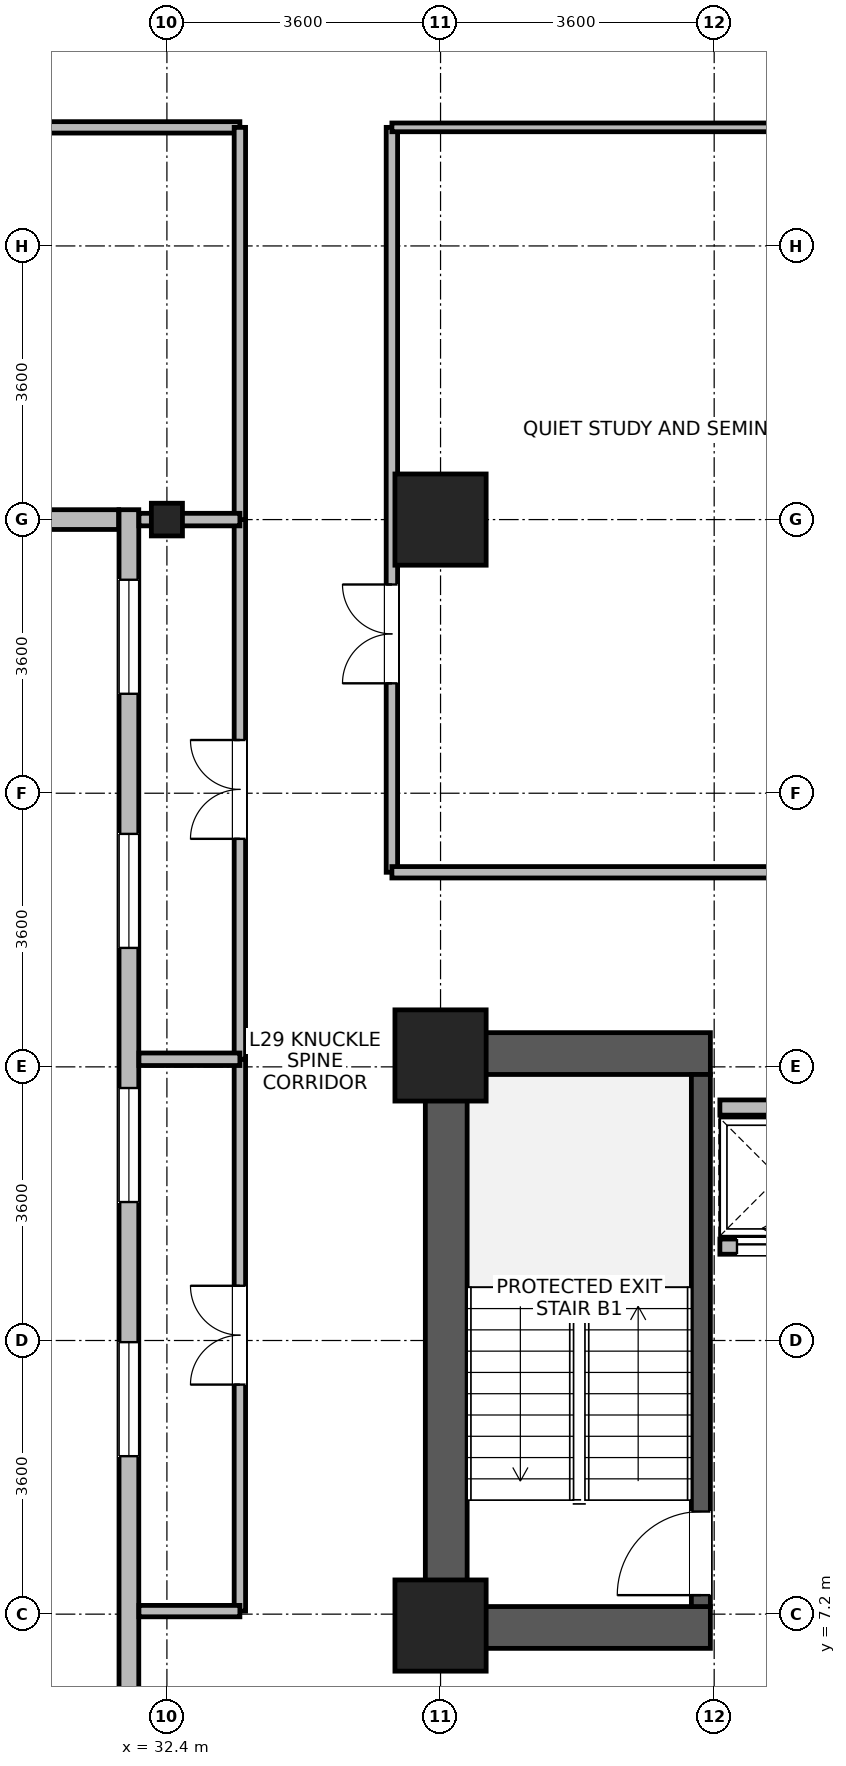
"""IFC4 building model, lengths in metres.
Left out: names, types, materials, properties, quantities, classifications, styles, units other than length and angle.
Written with IfcOpenShell. Run it as: python <this file> out.ifc"""

import sys

from ifc_helpers import new_model, si_unit, direction, frame, frame_2d, origin, origin_2d, place, context, subcontext, project, spatial, rectangle, i_section, extrude, source, transform, mapped, element, fill, save


model = new_model("IFC4")
c1 = context("Model", 3, precision=1e-05, world=origin(), true_north=direction((0.0, 1.0)))
c2 = subcontext(c1, "Body", "Model", "MODEL_VIEW")
j1 = project(units=[si_unit("LENGTHUNIT", "METRE"), si_unit("PLANEANGLEUNIT", "RADIAN")], contexts=[c1])
p1 = place(None, origin())
s1 = spatial("IfcSite", under=j1, at=p1, CompositionType="ELEMENT")
p2 = place(p1, origin())
s2 = spatial("IfcBuilding", under=s1, at=p2, CompositionType="ELEMENT")
p3 = place(p2, frame((0.0, 0.0, 115.6)))
s3 = spatial("IfcBuildingStorey", under=s2, at=p3, CompositionType="ELEMENT", Elevation=115.6)
p4 = place(p3, frame((36.075, 6.75, 0.0), z_axis=(0.0, 0.0, 1.0), x_axis=(0.0, 1.0, 0.0)))
e1 = element("IfcWall", 1, at=p4, inside=s3, PredefinedType="SHEAR", context=c2, shape_type="SweptSolid", body=[
    extrude(rectangle(XDim=8.1, YDim=0.55, at=frame_2d((4.05, 0.0))), origin(), (0.0, 0.0, 1.0), 3.45),
])
for number, where, z_axis, x_axis in (
    (2, (36.35, 7.025, 0.0), (0.0, 0.0, 1.0), (1.0, 0.0, 0.0)),
    (3, (36.35, 14.575, 0.0), (0.0, 0.0, 1.0), (1.0, 0.0, 0.0)),
):
    element("IfcWall", number, at=place(p3, frame(where, z_axis=z_axis, x_axis=x_axis)), inside=s3, PredefinedType="SHEAR", context=c2, shape_type="SweptSolid", body=[
        extrude(rectangle(XDim=3.2, YDim=0.55, at=frame_2d((1.6, 0.0))), origin(), (0.0, 0.0, 1.0), 3.45),
    ])
p5 = place(p3, frame((39.425, 7.3, 0.0), z_axis=(0.0, 0.0, 1.0), x_axis=(0.0, 1.0, 0.0)))
e4 = element("IfcWall", 4, at=p5, inside=s3, PredefinedType="SHEAR", context=c2, shape_type="SweptSolid", body=[
    extrude(rectangle(XDim=7.0, YDim=0.25, at=frame_2d((3.5, 0.0))), origin(), (0.0, 0.0, 1.0), 3.45),
])
p6 = place(p5, frame((0.15, 0.0, 0.0)))
e5 = element("IfcOpeningElement", 5, at=p6, cuts=e4, PredefinedType="OPENING", context=c2, shape_type="SweptSolid", body=[
    extrude(rectangle(XDim=1.1, YDim=2.08, at=frame_2d((0.55, 1.04))), frame((0.0, 0.135, 0.0), z_axis=(0.0, -1.0, 0.0), x_axis=(1.0, 0.0, 0.0)), (0.0, 0.0, 1.0), 0.27),
])
m1 = source(origin(), c2, "Body", "SweptSolid", [
    extrude(rectangle(XDim=1.2, YDim=1.2, at=origin_2d()), origin(), (0.0, 0.0, 1.0), 3.7),
])
for number, where, z_axis, x_axis in (
    (6, (36.0, 21.6, 0.0), (0.0, 0.0, 1.0), (1.0, 0.0, 0.0)),
    (7, (36.0, 7.05, 0.0), (0.0, 0.0, 1.0), (1.0, 0.0, 0.0)),
    (8, (36.0, 14.55, 0.0), (0.0, 0.0, 1.0), (1.0, 0.0, 0.0)),
):
    element("IfcColumn", number, at=place(p3, frame(where, z_axis=z_axis, x_axis=x_axis)), inside=s3, PredefinedType="COLUMN", context=c2, shape_type="MappedRepresentation", body=[
        mapped(m1, transform((0.0, 0.0, 0.0), x_axis=(1.0, 0.0, 0.0), y_axis=(0.0, 1.0, 0.0), z_axis=(0.0, 0.0, 1.0), scale=1.0)),
    ])
m2 = source(origin(), c2, "Body", "SweptSolid", [
    extrude(i_section(OverallWidth=0.409, OverallDepth=0.43, WebThickness=0.024, FlangeThickness=0.033, FilletRadius=0.015, at=origin_2d()), origin(), (0.0, 0.0, 1.0), 3.7),
])
p7 = place(p3, frame((32.4, 21.6, 0.0), z_axis=(0.0, 0.0, 1.0), x_axis=(1.0, 0.0, 0.0)))
e9 = element("IfcColumn", 9, at=p7, inside=s3, PredefinedType="COLUMN", context=c2, shape_type="MappedRepresentation", body=[
    mapped(m2, transform((0.0, 0.0, 0.0), x_axis=(1.0, 0.0, 0.0), y_axis=(0.0, 1.0, 0.0), z_axis=(0.0, 0.0, 1.0), scale=1.0)),
])
p8 = place(p3, frame((31.765, 21.6, 0.0), z_axis=(0.0, 0.0, 1.0), x_axis=(-1.0, 0.0, 0.0)))
e10 = element("IfcWall", 10, at=p8, inside=s3, PredefinedType="STANDARD", context=c2, shape_type="SweptSolid", body=[
    extrude(rectangle(XDim=2.364, YDim=0.26, at=frame_2d((1.182, 0.0))), origin(), (0.0, 0.0, 1.0), 2.98),
])
p9 = place(p3, frame((31.9, 1.67, 0.0), z_axis=(0.0, 0.0, 1.0), x_axis=(0.0, 1.0, 0.0)))
e11 = element("IfcWall", 11, at=p9, inside=s3, PredefinedType="STANDARD", context=c2, shape_type="SweptSolid", body=[
    extrude(rectangle(XDim=20.06, YDim=0.26, at=frame_2d((10.03, 0.0))), origin(), (0.0, 0.0, 1.0), 3.43),
])
p10 = place(p9, frame((0.922, 0.0, 0.85)))
e12 = element("IfcOpeningElement", 12, at=p10, cuts=e11, PredefinedType="OPENING", context=c2, shape_type="SweptSolid", body=[
    extrude(rectangle(XDim=1.5, YDim=1.85, at=frame_2d((0.75, 0.925))), frame((0.0, 0.14, 0.0), z_axis=(0.0, -1.0, 0.0), x_axis=(1.0, 0.0, 0.0)), (0.0, 0.0, 1.0), 0.28),
])
p11 = place(p9, frame((7.608, 0.0, 0.85)))
e13 = element("IfcOpeningElement", 13, at=p11, cuts=e11, PredefinedType="OPENING", context=c2, shape_type="SweptSolid", body=[
    extrude(rectangle(XDim=1.5, YDim=1.85, at=frame_2d((0.75, 0.925))), frame((0.0, 0.14, 0.0), z_axis=(0.0, -1.0, 0.0), x_axis=(1.0, 0.0, 0.0)), (0.0, 0.0, 1.0), 0.28),
])
p12 = place(p9, frame((10.952, 0.0, 0.85)))
e14 = element("IfcOpeningElement", 14, at=p12, cuts=e11, PredefinedType="OPENING", context=c2, shape_type="SweptSolid", body=[
    extrude(rectangle(XDim=1.5, YDim=1.85, at=frame_2d((0.75, 0.925))), frame((0.0, 0.14, 0.0), z_axis=(0.0, -1.0, 0.0), x_axis=(1.0, 0.0, 0.0)), (0.0, 0.0, 1.0), 0.28),
])
p13 = place(p9, frame((14.295, 0.0, 0.85)))
e15 = element("IfcOpeningElement", 15, at=p13, cuts=e11, PredefinedType="OPENING", context=c2, shape_type="SweptSolid", body=[
    extrude(rectangle(XDim=1.5, YDim=1.85, at=frame_2d((0.75, 0.925))), frame((0.0, 0.14, 0.0), z_axis=(0.0, -1.0, 0.0), x_axis=(1.0, 0.0, 0.0)), (0.0, 0.0, 1.0), 0.28),
])
p14 = place(p9, frame((17.638, 0.0, 0.85)))
e16 = element("IfcOpeningElement", 16, at=p14, cuts=e11, PredefinedType="OPENING", context=c2, shape_type="SweptSolid", body=[
    extrude(rectangle(XDim=1.5, YDim=1.85, at=frame_2d((0.75, 0.925))), frame((0.0, 0.14, 0.0), z_axis=(0.0, -1.0, 0.0), x_axis=(1.0, 0.0, 0.0)), (0.0, 0.0, 1.0), 0.28),
])
p15 = place(p3, frame((39.675, 12.035, 0.0), z_axis=(0.0, 0.0, 1.0), x_axis=(1.0, 0.0, 0.0)))
e17 = element("IfcWall", 17, at=p15, inside=s3, PredefinedType="PARTITIONING", context=c2, shape_type="SweptSolid", body=[
    extrude(rectangle(XDim=1.55, YDim=0.2, at=frame_2d((0.775, 0.0))), origin(), (0.0, 0.0, 1.0), 3.43),
])
p16 = place(p15, frame((0.225, 0.0, 0.0)))
e18 = element("IfcOpeningElement", 18, at=p16, cuts=e17, PredefinedType="OPENING", context=c2, shape_type="SweptSolid", body=[
    extrude(rectangle(XDim=1.1, YDim=2.12, at=frame_2d((0.55, 1.06))), frame((0.0, 0.11, 0.0), z_axis=(0.0, -1.0, 0.0), x_axis=(1.0, 0.0, 0.0)), (0.0, 0.0, 1.0), 0.22),
])
p17 = place(p3, frame((39.675, 13.865, 0.0), z_axis=(0.0, 0.0, 1.0), x_axis=(1.0, 0.0, 0.0)))
e19 = element("IfcWall", 19, at=p17, inside=s3, PredefinedType="PARTITIONING", context=c2, shape_type="SweptSolid", body=[
    extrude(rectangle(XDim=1.55, YDim=0.2, at=frame_2d((0.775, 0.0))), origin(), (0.0, 0.0, 1.0), 3.43),
])
p18 = place(p3, frame((35.36, 16.96, 0.0), z_axis=(0.0, 0.0, 1.0), x_axis=(0.0, 1.0, 0.0)))
e20 = element("IfcWall", 20, at=p18, inside=s3, PredefinedType="PARTITIONING", context=c2, shape_type="SweptSolid", body=[
    extrude(rectangle(XDim=9.8, YDim=0.15, at=frame_2d((4.9, 0.0))), origin(), (0.0, 0.0, 1.0), 3.43),
])
p19 = place(p18, frame((2.486, 0.0, 0.0)))
e21 = element("IfcOpeningElement", 21, at=p19, cuts=e20, PredefinedType="OPENING", context=c2, shape_type="SweptSolid", body=[
    extrude(rectangle(XDim=1.3, YDim=2.12, at=frame_2d((0.65, 1.06))), frame((0.0, 0.085, 0.0), z_axis=(0.0, -1.0, 0.0), x_axis=(1.0, 0.0, 0.0)), (0.0, 0.0, 1.0), 0.17),
])
p20 = place(p3, frame((24.04, 26.76, 0.0), z_axis=(0.0, 0.0, 1.0), x_axis=(1.0, 0.0, 0.0)))
e22 = element("IfcWall", 22, at=p20, inside=s3, PredefinedType="PARTITIONING", context=c2, shape_type="SweptSolid", body=[
    extrude(rectangle(XDim=9.32, YDim=0.15, at=frame_2d((4.66, 0.0))), origin(), (0.0, 0.0, 1.0), 3.43),
])
p21 = place(p20, frame((4.01, 0.0, 0.0)))
e23 = element("IfcOpeningElement", 23, at=p21, cuts=e22, PredefinedType="OPENING", context=c2, shape_type="SweptSolid", body=[
    extrude(rectangle(XDim=1.3, YDim=2.12, at=frame_2d((0.65, 1.06))), frame((0.0, 0.085, 0.0), z_axis=(0.0, -1.0, 0.0), x_axis=(1.0, 0.0, 0.0)), (0.0, 0.0, 1.0), 0.17),
])
p22 = place(p3, frame((35.36, 16.96, 0.0), z_axis=(0.0, 0.0, 1.0), x_axis=(1.0, 0.0, 0.0)))
e24 = element("IfcWall", 24, at=p22, inside=s3, PredefinedType="PARTITIONING", context=c2, shape_type="SweptSolid", body=[
    extrude(rectangle(XDim=7.84, YDim=0.15, at=frame_2d((3.92, 0.0))), origin(), (0.0, 0.0, 1.0), 3.43),
])
p23 = place(p3, frame((33.36, 7.24, 0.0), z_axis=(0.0, 0.0, 1.0), x_axis=(0.0, 1.0, 0.0)))
e25 = element("IfcWall", 25, at=p23, inside=s3, PredefinedType="PARTITIONING", context=c2, shape_type="SweptSolid", body=[
    extrude(rectangle(XDim=7.26, YDim=0.15, at=frame_2d((3.63, 0.0))), origin(), (0.0, 0.0, 1.0), 3.43),
])
p24 = place(p23, frame((2.98, 0.0, 0.0)))
e26 = element("IfcOpeningElement", 26, at=p24, cuts=e25, PredefinedType="OPENING", context=c2, shape_type="SweptSolid", body=[
    extrude(rectangle(XDim=1.3, YDim=2.12, at=frame_2d((0.65, 1.06))), frame((0.0, 0.085, 0.0), z_axis=(0.0, -1.0, 0.0), x_axis=(1.0, 0.0, 0.0)), (0.0, 0.0, 1.0), 0.17),
])
p25 = place(p3, frame((33.36, 14.5, 0.0), z_axis=(0.0, 0.0, 1.0), x_axis=(0.0, 1.0, 0.0)))
e27 = element("IfcWall", 27, at=p25, inside=s3, PredefinedType="PARTITIONING", context=c2, shape_type="SweptSolid", body=[
    extrude(rectangle(XDim=7.1, YDim=0.15, at=frame_2d((3.55, 0.0))), origin(), (0.0, 0.0, 1.0), 3.43),
])
p26 = place(p25, frame((2.9, 0.0, 0.0)))
e28 = element("IfcOpeningElement", 28, at=p26, cuts=e27, PredefinedType="OPENING", context=c2, shape_type="SweptSolid", body=[
    extrude(rectangle(XDim=1.3, YDim=2.12, at=frame_2d((0.65, 1.06))), frame((0.0, 0.085, 0.0), z_axis=(0.0, -1.0, 0.0), x_axis=(1.0, 0.0, 0.0)), (0.0, 0.0, 1.0), 0.17),
])
p27 = place(p3, frame((33.36, 21.6, 0.0), z_axis=(0.0, 0.0, 1.0), x_axis=(0.0, 1.0, 0.0)))
e29 = element("IfcWall", 29, at=p27, inside=s3, PredefinedType="PARTITIONING", context=c2, shape_type="SweptSolid", body=[
    extrude(rectangle(XDim=5.16, YDim=0.15, at=frame_2d((2.58, 0.0))), origin(), (0.0, 0.0, 1.0), 3.43),
])
p28 = place(p3, frame((32.032, 7.24, 0.0), z_axis=(0.0, 0.0, 1.0), x_axis=(1.0, 0.0, 0.0)))
e30 = element("IfcWall", 30, at=p28, inside=s3, PredefinedType="PARTITIONING", context=c2, shape_type="SweptSolid", body=[
    extrude(rectangle(XDim=1.328, YDim=0.15, at=frame_2d((0.664, 0.0))), origin(), (0.0, 0.0, 1.0), 3.43),
])
p29 = place(p3, frame((35.36, 26.76, 0.0), z_axis=(0.0, 0.0, 1.0), x_axis=(1.0, 0.0, 0.0)))
e31 = element("IfcWall", 31, at=p29, inside=s3, PredefinedType="PARTITIONING", context=c2, shape_type="SweptSolid", body=[
    extrude(rectangle(XDim=7.84, YDim=0.115, at=frame_2d((3.92, 0.0))), origin(), (0.0, 0.0, 1.0), 3.43),
])
p30 = place(p3, frame((32.032, 14.5, 0.0), z_axis=(0.0, 0.0, 1.0), x_axis=(1.0, 0.0, 0.0)))
e32 = element("IfcWall", 32, at=p30, inside=s3, PredefinedType="PARTITIONING", context=c2, shape_type="SweptSolid", body=[
    extrude(rectangle(XDim=1.328, YDim=0.165, at=frame_2d((0.664, 0.0))), origin(), (0.0, 0.0, 1.0), 3.43),
])
p31 = place(p3, frame((32.032, 21.6, 0.0), z_axis=(0.0, 0.0, 1.0), x_axis=(1.0, 0.0, 0.0)))
e33 = element("IfcWall", 33, at=p31, inside=s3, PredefinedType="PARTITIONING", context=c2, shape_type="SweptSolid", body=[
    extrude(rectangle(XDim=1.328, YDim=0.165, at=frame_2d((0.664, 0.0))), origin(), (0.0, 0.0, 1.0), 2.98),
])
p32 = place(p11, origin())
e34 = element("IfcWindow", 34, at=p32, inside=s3, PartitioningType="SINGLE_PANEL", PredefinedType="WINDOW", context=c2, shape_type="SweptSolid", body=[
    extrude(rectangle(XDim=1.5, YDim=1.85, at=frame_2d((0.75, 0.925))), frame((0.0, 0.03, 0.0), z_axis=(0.0, -1.0, 0.0), x_axis=(1.0, 0.0, 0.0)), (0.0, 0.0, 1.0), 0.06),
])
fill(e13, e34)
p33 = place(p12, origin())
e35 = element("IfcWindow", 35, at=p33, inside=s3, PartitioningType="SINGLE_PANEL", PredefinedType="WINDOW", context=c2, shape_type="SweptSolid", body=[
    extrude(rectangle(XDim=1.5, YDim=1.85, at=frame_2d((0.75, 0.925))), frame((0.0, 0.03, 0.0), z_axis=(0.0, -1.0, 0.0), x_axis=(1.0, 0.0, 0.0)), (0.0, 0.0, 1.0), 0.06),
])
fill(e14, e35)
p34 = place(p13, origin())
e36 = element("IfcWindow", 36, at=p34, inside=s3, PartitioningType="SINGLE_PANEL", PredefinedType="WINDOW", context=c2, shape_type="SweptSolid", body=[
    extrude(rectangle(XDim=1.5, YDim=1.85, at=frame_2d((0.75, 0.925))), frame((0.0, 0.03, 0.0), z_axis=(0.0, -1.0, 0.0), x_axis=(1.0, 0.0, 0.0)), (0.0, 0.0, 1.0), 0.06),
])
fill(e15, e36)
p35 = place(p14, origin())
e37 = element("IfcWindow", 37, at=p35, inside=s3, PartitioningType="SINGLE_PANEL", PredefinedType="WINDOW", context=c2, shape_type="SweptSolid", body=[
    extrude(rectangle(XDim=1.5, YDim=1.85, at=frame_2d((0.75, 0.925))), frame((0.0, 0.03, 0.0), z_axis=(0.0, -1.0, 0.0), x_axis=(1.0, 0.0, 0.0)), (0.0, 0.0, 1.0), 0.06),
])
fill(e16, e37)
p36 = place(p6, origin())
e38 = element("IfcDoor", 38, at=p36, inside=s3, OperationType="SINGLE_SWING_LEFT", PredefinedType="DOOR", context=c2, shape_type="SweptSolid", body=[
    extrude(rectangle(XDim=1.1, YDim=2.08, at=frame_2d((0.55, 1.04))), frame((0.0, 0.025, 0.0), z_axis=(0.0, -1.0, 0.0), x_axis=(1.0, 0.0, 0.0)), (0.0, 0.0, 1.0), 0.05),
])
fill(e5, e38)
p37 = place(p16, origin())
e39 = element("IfcDoor", 39, at=p37, inside=s3, OperationType="SLIDING_TO_LEFT", PredefinedType="DOOR", context=c2, shape_type="SweptSolid", body=[
    extrude(rectangle(XDim=1.1, YDim=2.12, at=frame_2d((0.55, 1.06))), frame((0.0, 0.025, 0.0), z_axis=(0.0, -1.0, 0.0), x_axis=(1.0, 0.0, 0.0)), (0.0, 0.0, 1.0), 0.05),
])
fill(e18, e39)
p38 = place(p19, origin())
e40 = element("IfcDoor", 40, at=p38, inside=s3, OperationType="DOUBLE_DOOR_SINGLE_SWING", PredefinedType="DOOR", context=c2, shape_type="SweptSolid", body=[
    extrude(rectangle(XDim=1.3, YDim=2.12, at=frame_2d((0.65, 1.06))), frame((0.0, 0.025, 0.0), z_axis=(0.0, -1.0, 0.0), x_axis=(1.0, 0.0, 0.0)), (0.0, 0.0, 1.0), 0.05),
])
fill(e21, e40)
p39 = place(p24, origin())
e41 = element("IfcDoor", 41, at=p39, inside=s3, OperationType="DOUBLE_DOOR_SINGLE_SWING", PredefinedType="DOOR", context=c2, shape_type="SweptSolid", body=[
    extrude(rectangle(XDim=1.3, YDim=2.12, at=frame_2d((0.65, 1.06))), frame((0.0, 0.025, 0.0), z_axis=(0.0, -1.0, 0.0), x_axis=(1.0, 0.0, 0.0)), (0.0, 0.0, 1.0), 0.05),
])
fill(e26, e41)
p40 = place(p26, origin())
e42 = element("IfcDoor", 42, at=p40, inside=s3, OperationType="DOUBLE_DOOR_SINGLE_SWING", PredefinedType="DOOR", context=c2, shape_type="SweptSolid", body=[
    extrude(rectangle(XDim=1.3, YDim=2.12, at=frame_2d((0.65, 1.06))), frame((0.0, 0.025, 0.0), z_axis=(0.0, -1.0, 0.0), x_axis=(1.0, 0.0, 0.0)), (0.0, 0.0, 1.0), 0.05),
])
fill(e28, e42)
save(model, sys.argv[1])
